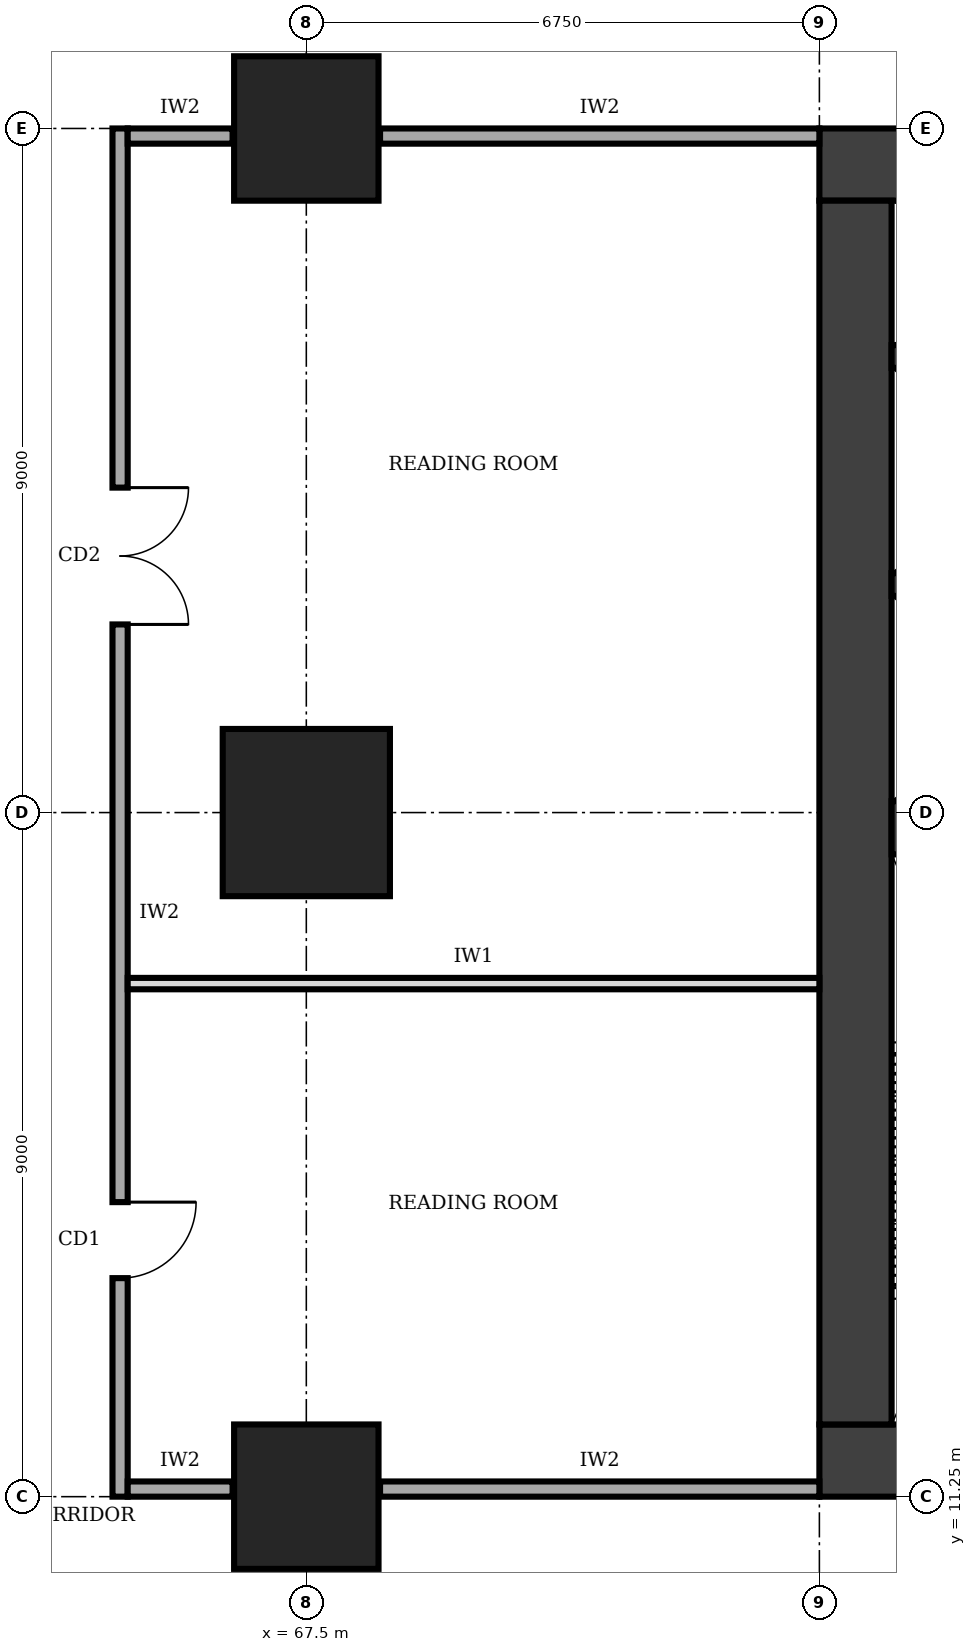
"""IFC4 building model, lengths in metres.
Left out: names, types, materials, properties, quantities, classifications, styles, units other than length and angle.
Written with IfcOpenShell. Run it as: python <this file> out.ifc"""

import sys

from ifc_helpers import new_model, si_unit, direction, frame, frame_2d, origin, origin_2d, place, context, subcontext, project, spatial, rectangle, extrude, element, fill, save


model = new_model("IFC4")
c1 = context("Model", 3, precision=1e-05, world=origin(), true_north=direction((0.0, 1.0)))
c2 = subcontext(c1, "Body", "Model", "MODEL_VIEW")
j1 = project(units=[si_unit("LENGTHUNIT", "METRE"), si_unit("PLANEANGLEUNIT", "RADIAN")], contexts=[c1])
p1 = place(None, origin())
s1 = spatial("IfcSite", under=j1, at=p1, CompositionType="ELEMENT")
p2 = place(p1, origin())
s2 = spatial("IfcBuilding", under=s1, at=p2, CompositionType="ELEMENT")
p3 = place(p2, frame((0.0, 0.0, 161.0)))
s3 = spatial("IfcBuildingStorey", under=s2, at=p3, CompositionType="ELEMENT", Elevation=161.0)
p4 = place(p3, frame((74.25, 11.725, 0.0), z_axis=(0.0, 0.0, 1.0), x_axis=(1.0, 0.0, 0.0)))
e1 = element("IfcWall", 1, at=p4, inside=s3, PredefinedType="SHEAR", context=c2, shape_type="SweptSolid", body=[
    extrude(rectangle(XDim=13.5, YDim=0.95, at=frame_2d((6.75, 0.0))), origin(), (0.0, 0.0, 1.0), 4.0),
])
p5 = place(p4, frame((4.75, 0.0, 0.0)))
e2 = element("IfcOpeningElement", 2, at=p5, cuts=e1, PredefinedType="OPENING", context=c2, shape_type="SweptSolid", body=[
    extrude(rectangle(XDim=1.0, YDim=2.1, at=frame_2d((0.5, 1.05))), frame((0.0, 0.485, 0.0), z_axis=(0.0, -1.0, 0.0), x_axis=(1.0, 0.0, 0.0)), (0.0, 0.0, 1.0), 0.97),
])
p6 = place(p3, frame((87.75, 28.775, 0.0), z_axis=(0.0, 0.0, 1.0), x_axis=(-1.0, 0.0, 0.0)))
e3 = element("IfcWall", 3, at=p6, inside=s3, PredefinedType="SHEAR", context=c2, shape_type="SweptSolid", body=[
    extrude(rectangle(XDim=13.5, YDim=0.95, at=frame_2d((6.75, 0.0))), origin(), (0.0, 0.0, 1.0), 4.0),
])
p7 = place(p6, frame((4.75, 0.0, 0.0)))
e4 = element("IfcOpeningElement", 4, at=p7, cuts=e3, PredefinedType="OPENING", context=c2, shape_type="SweptSolid", body=[
    extrude(rectangle(XDim=1.8, YDim=2.1, at=frame_2d((0.9, 1.05))), frame((0.0, 0.485, 0.0), z_axis=(0.0, -1.0, 0.0), x_axis=(1.0, 0.0, 0.0)), (0.0, 0.0, 1.0), 0.97),
])
p8 = place(p3, frame((74.725, 28.3, 0.0), z_axis=(0.0, 0.0, 1.0), x_axis=(0.0, -1.0, 0.0)))
e5 = element("IfcWall", 5, at=p8, inside=s3, PredefinedType="SHEAR", context=c2, shape_type="SweptSolid", body=[
    extrude(rectangle(XDim=16.1, YDim=0.95, at=frame_2d((8.05, 0.0))), origin(), (0.0, 0.0, 1.0), 4.0),
])
p9 = place(p3, frame((75.2, 20.05, 0.0), z_axis=(0.0, 0.0, 1.0), x_axis=(1.0, 0.0, 0.0)))
e6 = element("IfcWall", 6, at=p9, inside=s3, PredefinedType="SHEAR", context=c2, shape_type="SweptSolid", body=[
    extrude(rectangle(XDim=3.4, YDim=0.7, at=frame_2d((1.7, 0.0))), origin(), (0.0, 0.0, 1.0), 4.0),
])
for number, where, z_axis, x_axis in (
    (7, (75.2, 23.25, 0.0), (0.0, 0.0, 1.0), (1.0, 0.0, 0.0)),
    (8, (75.2, 26.25, 0.0), (0.0, 0.0, 1.0), (1.0, 0.0, 0.0)),
):
    element("IfcWall", number, at=place(p3, frame(where, z_axis=z_axis, x_axis=x_axis)), inside=s3, PredefinedType="SHEAR", context=c2, shape_type="SweptSolid", body=[
        extrude(rectangle(XDim=3.4, YDim=0.3, at=frame_2d((1.7, 0.0))), origin(), (0.0, 0.0, 1.0), 4.0),
    ])
p10 = place(p3, frame((67.5, 11.25, 0.0), z_axis=(0.0, 0.0, 1.0), x_axis=(1.0, 0.0, 0.0)))
e9 = element("IfcColumn", 9, at=p10, inside=s3, PredefinedType="COLUMN", context=c2, shape_type="SweptSolid", body=[
    extrude(rectangle(XDim=1.9, YDim=1.9, at=origin_2d()), origin(), (0.0, 0.0, 1.0), 4.0),
])
p11 = place(p3, frame((67.5, 20.25, 0.0), z_axis=(0.0, 0.0, 1.0), x_axis=(1.0, 0.0, 0.0)))
e10 = element("IfcColumn", 10, at=p11, inside=s3, PredefinedType="COLUMN", context=c2, shape_type="SweptSolid", body=[
    extrude(rectangle(XDim=2.2, YDim=2.2, at=origin_2d()), origin(), (0.0, 0.0, 1.0), 4.0),
])
p12 = place(p3, frame((67.5, 29.25, 0.0), z_axis=(0.0, 0.0, 1.0), x_axis=(1.0, 0.0, 0.0)))
e11 = element("IfcColumn", 11, at=p12, inside=s3, PredefinedType="COLUMN", context=c2, shape_type="SweptSolid", body=[
    extrude(rectangle(XDim=1.9, YDim=1.9, at=origin_2d()), origin(), (0.0, 0.0, 1.0), 4.0),
])
p13 = place(p3, frame((65.05, 29.25, 0.0), z_axis=(0.0, 0.0, 1.0), x_axis=(0.0, -1.0, 0.0)))
e12 = element("IfcWall", 12, at=p13, inside=s3, PredefinedType="SOLIDWALL", context=c2, shape_type="SweptSolid", body=[
    extrude(rectangle(XDim=18.0, YDim=0.2, at=frame_2d((9.0, 0.0))), origin(), (0.0, 0.0, 1.0), 3.75),
])
p14 = place(p13, frame((14.125, 0.0, 0.0)))
e13 = element("IfcOpeningElement", 13, at=p14, cuts=e12, PredefinedType="OPENING", context=c2, shape_type="SweptSolid", body=[
    extrude(rectangle(XDim=1.0, YDim=2.1, at=frame_2d((0.5, 1.05))), frame((0.0, 0.11, 0.0), z_axis=(0.0, -1.0, 0.0), x_axis=(1.0, 0.0, 0.0)), (0.0, 0.0, 1.0), 0.22),
])
p15 = place(p13, frame((4.725, 0.0, 0.0)))
e14 = element("IfcOpeningElement", 14, at=p15, cuts=e12, PredefinedType="OPENING", context=c2, shape_type="SweptSolid", body=[
    extrude(rectangle(XDim=1.8, YDim=2.1, at=frame_2d((0.9, 1.05))), frame((0.0, 0.11, 0.0), z_axis=(0.0, -1.0, 0.0), x_axis=(1.0, 0.0, 0.0)), (0.0, 0.0, 1.0), 0.22),
])
p16 = place(p3, frame((65.15, 11.35, 0.0), z_axis=(0.0, 0.0, 1.0), x_axis=(1.0, 0.0, 0.0)))
e15 = element("IfcWall", 15, at=p16, inside=s3, PredefinedType="SOLIDWALL", context=c2, shape_type="SweptSolid", body=[
    extrude(rectangle(XDim=1.38, YDim=0.2, at=frame_2d((0.69, 0.0))), origin(), (0.0, 0.0, 1.0), 2.85),
])
p17 = place(p3, frame((68.47, 11.35, 0.0), z_axis=(0.0, 0.0, 1.0), x_axis=(1.0, 0.0, 0.0)))
e16 = element("IfcWall", 16, at=p17, inside=s3, PredefinedType="SOLIDWALL", context=c2, shape_type="SweptSolid", body=[
    extrude(rectangle(XDim=5.78, YDim=0.2, at=frame_2d((2.89, 0.0))), origin(), (0.0, 0.0, 1.0), 2.85),
])
p18 = place(p3, frame((65.15, 29.15, 0.0), z_axis=(0.0, 0.0, 1.0), x_axis=(1.0, 0.0, 0.0)))
e17 = element("IfcWall", 17, at=p18, inside=s3, PredefinedType="SOLIDWALL", context=c2, shape_type="SweptSolid", body=[
    extrude(rectangle(XDim=1.38, YDim=0.2, at=frame_2d((0.69, 0.0))), origin(), (0.0, 0.0, 1.0), 2.85),
])
p19 = place(p3, frame((68.47, 29.15, 0.0), z_axis=(0.0, 0.0, 1.0), x_axis=(1.0, 0.0, 0.0)))
e18 = element("IfcWall", 18, at=p19, inside=s3, PredefinedType="SOLIDWALL", context=c2, shape_type="SweptSolid", body=[
    extrude(rectangle(XDim=5.78, YDim=0.2, at=frame_2d((2.89, 0.0))), origin(), (0.0, 0.0, 1.0), 2.85),
])
p20 = place(p3, frame((65.15, 18.0, 0.0), z_axis=(0.0, 0.0, 1.0), x_axis=(1.0, 0.0, 0.0)))
e19 = element("IfcWall", 19, at=p20, inside=s3, PredefinedType="PARTITIONING", context=c2, shape_type="SweptSolid", body=[
    extrude(rectangle(XDim=9.1, YDim=0.15, at=frame_2d((4.55, 0.0))), origin(), (0.0, 0.0, 1.0), 3.75),
])
p21 = place(p14, origin())
e20 = element("IfcDoor", 20, at=p21, inside=s3, OperationType="SINGLE_SWING_LEFT", PredefinedType="DOOR", context=c2, shape_type="SweptSolid", body=[
    extrude(rectangle(XDim=1.0, YDim=2.1, at=frame_2d((0.5, 1.05))), frame((0.0, 0.025, 0.0), z_axis=(0.0, -1.0, 0.0), x_axis=(1.0, 0.0, 0.0)), (0.0, 0.0, 1.0), 0.05),
])
fill(e13, e20)
p22 = place(p15, origin())
e21 = element("IfcDoor", 21, at=p22, inside=s3, OperationType="DOUBLE_DOOR_SINGLE_SWING", PredefinedType="DOOR", context=c2, shape_type="SweptSolid", body=[
    extrude(rectangle(XDim=1.8, YDim=2.1, at=frame_2d((0.9, 1.05))), frame((0.0, 0.025, 0.0), z_axis=(0.0, -1.0, 0.0), x_axis=(1.0, 0.0, 0.0)), (0.0, 0.0, 1.0), 0.05),
])
fill(e14, e21)
save(model, sys.argv[1])
